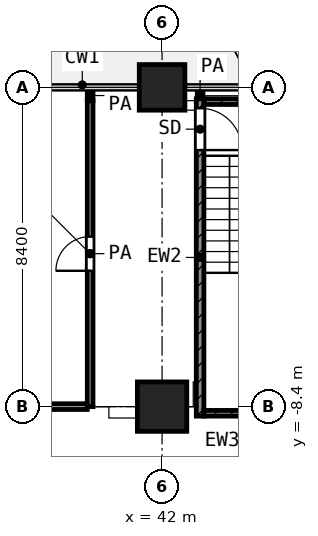
"""IFC4 building model, lengths in metres.
Left out: names, types, materials, properties, quantities, classifications, styles, units other than length and angle.
Written with IfcOpenShell. Run it as: python <this file> out.ifc"""

import sys

from ifc_helpers import new_model, si_unit, direction, frame, frame_2d, origin, origin_2d, place, context, subcontext, project, spatial, rectangle, extrude, element, fill, save


model = new_model("IFC4")
c1 = context("Model", 3, precision=1e-05, world=origin(), true_north=direction((0.0, 1.0)))
c2 = subcontext(c1, "Body", "Model", "MODEL_VIEW")
j1 = project(units=[si_unit("LENGTHUNIT", "METRE"), si_unit("PLANEANGLEUNIT", "RADIAN")], contexts=[c1])
p1 = place(None, origin())
s1 = spatial("IfcSite", under=j1, at=p1, CompositionType="ELEMENT")
p2 = place(p1, origin())
s2 = spatial("IfcBuilding", under=s1, at=p2, CompositionType="ELEMENT")
p3 = place(p2, frame((0.0, 0.0, 68.6)))
s3 = spatial("IfcBuildingStorey", under=s2, at=p3, CompositionType="ELEMENT", Elevation=68.6)
p4 = place(p3, frame((42.0, 0.0, 0.0), z_axis=(0.0, 0.0, 1.0), x_axis=(1.0, 0.0, 0.0)))
e1 = element("IfcColumn", 1, at=p4, inside=s3, PredefinedType="COLUMN", context=c2, shape_type="SweptSolid", body=[
    extrude(rectangle(XDim=1.2, YDim=1.2, at=origin_2d()), origin(), (0.0, 0.0, 1.0), 4.2),
])
p5 = place(p3, frame((42.0, -8.4, 0.0), z_axis=(0.0, 0.0, 1.0), x_axis=(1.0, 0.0, 0.0)))
e2 = element("IfcColumn", 2, at=p5, inside=s3, PredefinedType="COLUMN", context=c2, shape_type="SweptSolid", body=[
    extrude(rectangle(XDim=1.3, YDim=1.3, at=origin_2d()), origin(), (0.0, 0.0, 1.0), 4.2),
])
p6 = place(p3, frame((43.0, -8.65, 0.0), z_axis=(0.0, 0.0, 1.0), x_axis=(0.0, 1.0, 0.0)))
e3 = element("IfcWall", 3, at=p6, inside=s3, PredefinedType="SHEAR", context=c2, shape_type="SweptSolid", body=[
    extrude(rectangle(XDim=8.35, YDim=0.2, at=frame_2d((4.175, 0.0))), origin(), (0.0, 0.0, 1.0), 3.9),
])
p7 = place(p6, frame((7.0, 0.0, 0.0)))
e4 = element("IfcOpeningElement", 4, at=p7, cuts=e3, PredefinedType="OPENING", context=c2, shape_type="SweptSolid", body=[
    extrude(rectangle(XDim=1.1, YDim=2.1, at=frame_2d((0.55, 1.05))), frame((0.0, 0.11, 0.0), z_axis=(0.0, -1.0, 0.0), x_axis=(1.0, 0.0, 0.0)), (0.0, 0.0, 1.0), 0.22),
])
for number, where, z_axis, x_axis in (
    (5, (43.1, -0.375, 0.0), (0.0, 0.0, 1.0), (1.0, 0.0, 0.0)),
    (6, (43.1, -8.575, 0.0), (0.0, 0.0, 1.0), (1.0, 0.0, 0.0)),
):
    element("IfcWall", number, at=place(p3, frame(where, z_axis=z_axis, x_axis=x_axis)), inside=s3, PredefinedType="SHEAR", context=c2, shape_type="SweptSolid", body=[
        extrude(rectangle(XDim=2.85, YDim=0.15, at=frame_2d((1.425, 0.0))), origin(), (0.0, 0.0, 1.0), 3.9),
    ])
p8 = place(p3, frame((25.1, -8.4, 0.0), z_axis=(0.0, 0.0, 1.0), x_axis=(1.0, 0.0, 0.0)))
e7 = element("IfcWall", 7, at=p8, inside=s3, PredefinedType="PARTITIONING", context=c2, shape_type="SweptSolid", body=[
    extrude(rectangle(XDim=14.932, YDim=0.15, at=frame_2d((7.466, 0.0))), origin(), (0.0, 0.0, 1.0), 3.9),
])
p9 = place(p8, frame((3.55, 0.0, 0.0)))
e8 = element("IfcOpeningElement", 8, at=p9, cuts=e7, PredefinedType="OPENING", context=c2, shape_type="SweptSolid", body=[
    extrude(rectangle(XDim=1.5, YDim=2.1, at=frame_2d((0.75, 1.05))), frame((0.0, 0.085, 0.0), z_axis=(0.0, -1.0, 0.0), x_axis=(1.0, 0.0, 0.0)), (0.0, 0.0, 1.0), 0.17),
])
p10 = place(p8, frame((9.2, 0.0, 0.0)))
e9 = element("IfcOpeningElement", 9, at=p10, cuts=e7, PredefinedType="OPENING", context=c2, shape_type="SweptSolid", body=[
    extrude(rectangle(XDim=1.2, YDim=2.1, at=frame_2d((0.6, 1.05))), frame((0.0, 0.085, 0.0), z_axis=(0.0, -1.0, 0.0), x_axis=(1.0, 0.0, 0.0)), (0.0, 0.0, 1.0), 0.17),
])
p11 = place(p3, frame((40.107, -8.4, 0.0), z_axis=(0.0, 0.0, 1.0), x_axis=(0.0, 1.0, 0.0)))
e10 = element("IfcWall", 10, at=p11, inside=s3, PredefinedType="PARTITIONING", context=c2, shape_type="SweptSolid", body=[
    extrude(rectangle(XDim=8.048, YDim=0.15, at=frame_2d((4.024, 0.0))), origin(), (0.0, 0.0, 1.0), 3.9),
])
p12 = place(p11, frame((3.574, 0.0, 0.0)))
e11 = element("IfcOpeningElement", 11, at=p12, cuts=e10, PredefinedType="OPENING", context=c2, shape_type="SweptSolid", body=[
    extrude(rectangle(XDim=0.9, YDim=2.1, at=frame_2d((0.45, 1.05))), frame((0.0, 0.085, 0.0), z_axis=(0.0, -1.0, 0.0), x_axis=(1.0, 0.0, 0.0)), (0.0, 0.0, 1.0), 0.17),
])
p13 = place(p3, frame((40.107, -0.35, 0.0), z_axis=(0.0, 0.0, 1.0), x_axis=(0.0, 1.0, 0.0)))
e12 = element("IfcWall", 12, at=p13, inside=s3, PredefinedType="PARTITIONING", context=c2, shape_type="SweptSolid", body=[
    extrude(rectangle(XDim=0.27, YDim=0.15, at=frame_2d((0.135, 0.0))), origin(), (0.0, 0.0, 1.0), 3.9),
])
p14 = place(p3, frame((43.0, -0.27, 0.0), z_axis=(0.0, 0.0, 1.0), x_axis=(0.0, 1.0, 0.0)))
e13 = element("IfcWall", 13, at=p14, inside=s3, PredefinedType="PARTITIONING", context=c2, shape_type="SweptSolid", body=[
    extrude(rectangle(XDim=0.19, YDim=0.15, at=frame_2d((0.095, 0.0))), origin(), (0.0, 0.0, 1.0), 3.9),
])
p15 = place(p7, frame((1.1, 0.0, 0.0), z_axis=(0.0, 0.0, 1.0), x_axis=(-1.0, 0.0, 0.0)))
e14 = element("IfcDoor", 14, at=p15, inside=s3, OperationType="SINGLE_SWING_LEFT", PredefinedType="DOOR", context=c2, shape_type="SweptSolid", body=[
    extrude(rectangle(XDim=1.1, YDim=2.1, at=frame_2d((0.55, 1.05))), frame((0.0, 0.025, 0.0), z_axis=(0.0, -1.0, 0.0), x_axis=(1.0, 0.0, 0.0)), (0.0, 0.0, 1.0), 0.05),
])
fill(e4, e14)
p16 = place(p12, origin())
e15 = element("IfcDoor", 15, at=p16, inside=s3, OperationType="SINGLE_SWING_LEFT", PredefinedType="DOOR", context=c2, shape_type="SweptSolid", body=[
    extrude(rectangle(XDim=0.9, YDim=2.1, at=frame_2d((0.45, 1.05))), frame((0.0, 0.025, 0.0), z_axis=(0.0, -1.0, 0.0), x_axis=(1.0, 0.0, 0.0)), (0.0, 0.0, 1.0), 0.05),
])
fill(e11, e15)
save(model, sys.argv[1])
